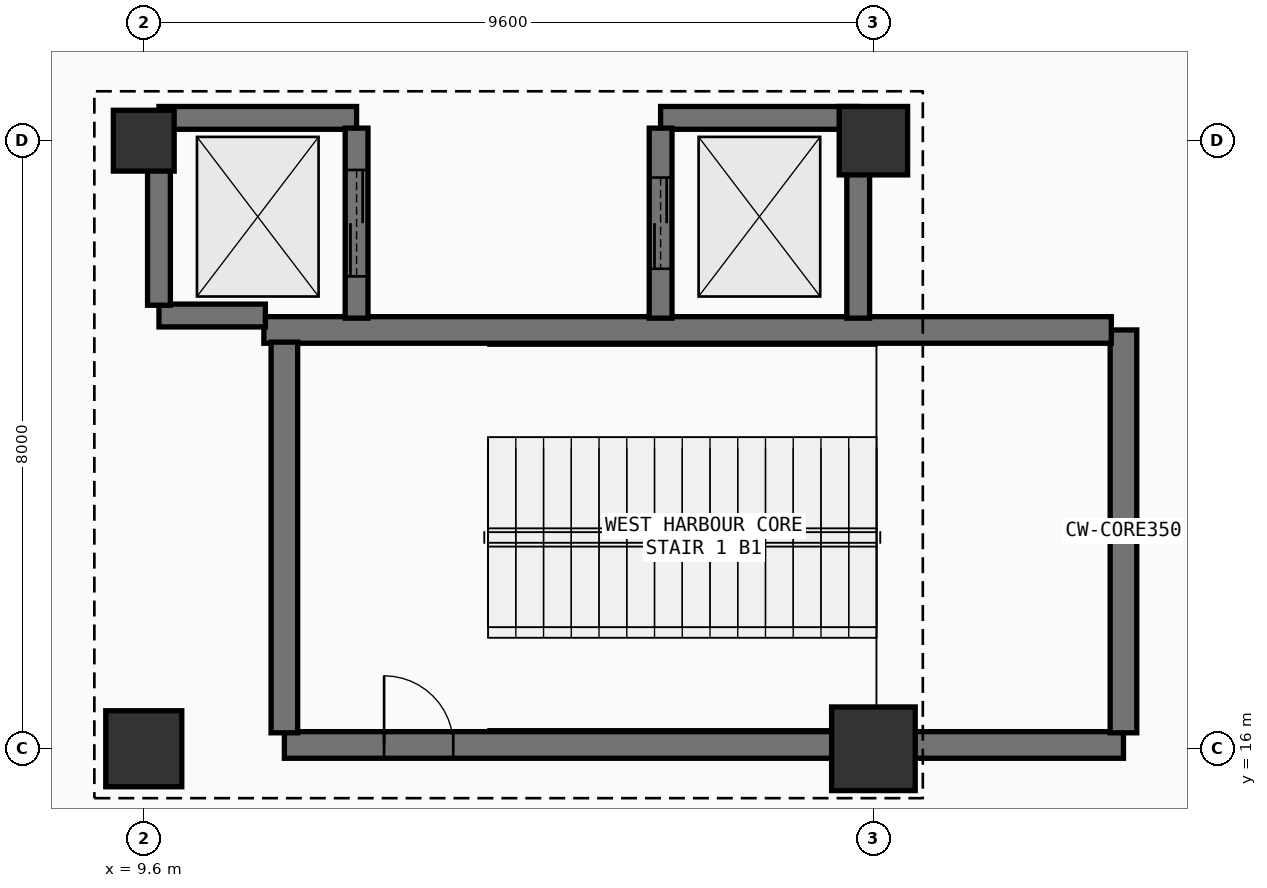
"""IFC4 building model, lengths in metres.
Left out: names, types, materials, properties, quantities, classifications, styles, units other than length and angle.
Written with IfcOpenShell. Run it as: python <this file> out.ifc"""

import sys

from ifc_helpers import new_model, si_unit, direction, frame, frame_2d, origin, origin_2d, place, context, subcontext, project, spatial, rectangle, circle, extrude, element, fill, save


model = new_model("IFC4")
c1 = context("Model", 3, precision=1e-05, world=origin(), true_north=direction((0.0, 1.0)))
c2 = subcontext(c1, "Body", "Model", "MODEL_VIEW")
j1 = project(units=[si_unit("LENGTHUNIT", "METRE"), si_unit("PLANEANGLEUNIT", "RADIAN")], contexts=[c1])
p1 = place(None, origin())
s1 = spatial("IfcSite", under=j1, at=p1, CompositionType="ELEMENT")
p2 = place(p1, origin())
s2 = spatial("IfcBuilding", under=s1, at=p2, CompositionType="ELEMENT")
p3 = place(p2, frame((0.0, 0.0, -5.4)))
s3 = spatial("IfcBuildingStorey", under=s2, at=p3, CompositionType="ELEMENT", Elevation=-5.4)
p4 = place(p3, frame((9.6, 16.0, 0.0), z_axis=(0.0, 0.0, 1.0), x_axis=(1.0, 0.0, 0.0)))
e1 = element("IfcColumn", 1, at=p4, inside=s3, PredefinedType="COLUMN", context=c2, shape_type="SweptSolid", body=[
    extrude(circle(Radius=0.5, at=origin_2d()), origin(), (0.0, 0.0, 1.0), 5.4),
])
p5 = place(p3, frame((9.6, 24.0, 0.0), z_axis=(0.0, 0.0, 1.0), x_axis=(1.0, 0.0, 0.0)))
e2 = element("IfcColumn", 2, at=p5, inside=s3, PredefinedType="COLUMN", context=c2, shape_type="SweptSolid", body=[
    extrude(circle(Radius=0.4, at=origin_2d()), origin(), (0.0, 0.0, 1.0), 5.4),
])
p6 = place(p3, frame((19.2, 16.0, 0.0), z_axis=(0.0, 0.0, 1.0), x_axis=(1.0, 0.0, 0.0)))
e3 = element("IfcColumn", 3, at=p6, inside=s3, PredefinedType="COLUMN", context=c2, shape_type="SweptSolid", body=[
    extrude(rectangle(XDim=1.1, YDim=1.1, at=origin_2d()), origin(), (0.0, 0.0, 1.0), 5.4),
])
p7 = place(p3, frame((19.2, 24.0, 0.0), z_axis=(0.0, 0.0, 1.0), x_axis=(1.0, 0.0, 0.0)))
e4 = element("IfcColumn", 4, at=p7, inside=s3, PredefinedType="COLUMN", context=c2, shape_type="SweptSolid", body=[
    extrude(rectangle(XDim=0.9, YDim=0.9, at=origin_2d()), origin(), (0.0, 0.0, 1.0), 5.4),
])
p8 = place(p3, frame((11.45, 16.05, 0.0), z_axis=(0.0, 0.0, 1.0), x_axis=(1.0, 0.0, 0.0)))
e5 = element("IfcWall", 5, at=p8, inside=s3, PredefinedType="SHEAR", context=c2, shape_type="SweptSolid", body=[
    extrude(rectangle(XDim=11.04, YDim=0.35, at=frame_2d((5.52, 0.0))), origin(), (0.0, 0.0, 1.0), 5.09),
])
p9 = place(p8, frame((1.312, 0.0, 0.0)))
e6 = element("IfcOpeningElement", 6, at=p9, cuts=e5, PredefinedType="OPENING", context=c2, shape_type="SweptSolid", body=[
    extrude(rectangle(XDim=0.91, YDim=2.08, at=frame_2d((0.455, 1.04))), frame((0.0, 0.185, 0.0), z_axis=(0.0, -1.0, 0.0), x_axis=(1.0, 0.0, 0.0)), (0.0, 0.0, 1.0), 0.37),
])
p10 = place(p3, frame((22.49, 16.21, 0.0), z_axis=(0.0, 0.0, 1.0), x_axis=(0.0, 1.0, 0.0)))
e7 = element("IfcWall", 7, at=p10, inside=s3, PredefinedType="SHEAR", context=c2, shape_type="SweptSolid", body=[
    extrude(rectangle(XDim=5.3, YDim=0.35, at=frame_2d((2.65, 0.0))), origin(), (0.0, 0.0, 1.0), 5.09),
])
p11 = place(p3, frame((22.33, 21.51, 0.0), z_axis=(0.0, 0.0, 1.0), x_axis=(-1.0, 0.0, 0.0)))
e8 = element("IfcWall", 8, at=p11, inside=s3, PredefinedType="SHEAR", context=c2, shape_type="SweptSolid", body=[
    extrude(rectangle(XDim=11.15, YDim=0.35, at=frame_2d((5.575, 0.0))), origin(), (0.0, 0.0, 1.0), 5.09),
])
p12 = place(p3, frame((11.45, 21.35, 0.0), z_axis=(0.0, 0.0, 1.0), x_axis=(0.0, -1.0, 0.0)))
e9 = element("IfcWall", 9, at=p12, inside=s3, PredefinedType="SHEAR", context=c2, shape_type="SweptSolid", body=[
    extrude(rectangle(XDim=5.14, YDim=0.35, at=frame_2d((2.57, 0.0))), origin(), (0.0, 0.0, 1.0), 5.09),
])
p13 = place(p3, frame((12.4, 24.3, 0.0), z_axis=(0.0, 0.0, 1.0), x_axis=(-1.0, 0.0, 0.0)))
e10 = element("IfcWall", 10, at=p13, inside=s3, PredefinedType="SHEAR", context=c2, shape_type="SweptSolid", body=[
    extrude(rectangle(XDim=2.6, YDim=0.3, at=frame_2d((1.3, 0.0))), origin(), (0.0, 0.0, 1.0), 5.09),
])
p14 = place(p3, frame((9.8, 21.7, 0.0), z_axis=(0.0, 0.0, 1.0), x_axis=(1.0, 0.0, 0.0)))
e11 = element("IfcWall", 11, at=p14, inside=s3, PredefinedType="SHEAR", context=c2, shape_type="SweptSolid", body=[
    extrude(rectangle(XDim=1.4, YDim=0.3, at=frame_2d((0.7, 0.0))), origin(), (0.0, 0.0, 1.0), 5.09),
])
p15 = place(p3, frame((12.4, 21.665, 0.0), z_axis=(0.0, 0.0, 1.0), x_axis=(0.0, 1.0, 0.0)))
e12 = element("IfcWall", 12, at=p15, inside=s3, PredefinedType="SHEAR", context=c2, shape_type="SweptSolid", body=[
    extrude(rectangle(XDim=2.5, YDim=0.3, at=frame_2d((1.25, 0.0))), origin(), (0.0, 0.0, 1.0), 5.09),
])
p16 = place(p15, frame((0.55, 0.0, 0.0)))
e13 = element("IfcOpeningElement", 13, at=p16, cuts=e12, PredefinedType="OPENING", context=c2, shape_type="SweptSolid", body=[
    extrude(rectangle(XDim=1.4, YDim=2.26, at=frame_2d((0.7, 1.13))), frame((0.0, 0.16, 0.0), z_axis=(0.0, -1.0, 0.0), x_axis=(1.0, 0.0, 0.0)), (0.0, 0.0, 1.0), 0.32),
])
p17 = place(p3, frame((9.8, 24.165, 0.0), z_axis=(0.0, 0.0, 1.0), x_axis=(0.0, -1.0, 0.0)))
e14 = element("IfcWall", 14, at=p17, inside=s3, PredefinedType="SHEAR", context=c2, shape_type="SweptSolid", body=[
    extrude(rectangle(XDim=2.33, YDim=0.3, at=frame_2d((1.165, 0.0))), origin(), (0.0, 0.0, 1.0), 5.09),
])
p18 = place(p3, frame((19.0, 24.3, 0.0), z_axis=(0.0, 0.0, 1.0), x_axis=(-1.0, 0.0, 0.0)))
e15 = element("IfcWall", 15, at=p18, inside=s3, PredefinedType="SHEAR", context=c2, shape_type="SweptSolid", body=[
    extrude(rectangle(XDim=2.6, YDim=0.3, at=frame_2d((1.3, 0.0))), origin(), (0.0, 0.0, 1.0), 5.09),
])
p19 = place(p3, frame((19.0, 21.665, 0.0), z_axis=(0.0, 0.0, 1.0), x_axis=(0.0, 1.0, 0.0)))
e16 = element("IfcWall", 16, at=p19, inside=s3, PredefinedType="SHEAR", context=c2, shape_type="SweptSolid", body=[
    extrude(rectangle(XDim=2.5, YDim=0.3, at=frame_2d((1.25, 0.0))), origin(), (0.0, 0.0, 1.0), 5.09),
])
p20 = place(p3, frame((16.4, 24.165, 0.0), z_axis=(0.0, 0.0, 1.0), x_axis=(0.0, -1.0, 0.0)))
e17 = element("IfcWall", 17, at=p20, inside=s3, PredefinedType="SHEAR", context=c2, shape_type="SweptSolid", body=[
    extrude(rectangle(XDim=2.5, YDim=0.3, at=frame_2d((1.25, 0.0))), origin(), (0.0, 0.0, 1.0), 5.09),
])
p21 = place(p20, frame((0.65, 0.0, 0.0)))
e18 = element("IfcOpeningElement", 18, at=p21, cuts=e17, PredefinedType="OPENING", context=c2, shape_type="SweptSolid", body=[
    extrude(rectangle(XDim=1.2, YDim=2.2, at=frame_2d((0.6, 1.1))), frame((0.0, 0.16, 0.0), z_axis=(0.0, -1.0, 0.0), x_axis=(1.0, 0.0, 0.0)), (0.0, 0.0, 1.0), 0.32),
])
p22 = place(p9, origin())
e19 = element("IfcDoor", 19, at=p22, inside=s3, OperationType="SINGLE_SWING_LEFT", PredefinedType="DOOR", context=c2, shape_type="SweptSolid", body=[
    extrude(rectangle(XDim=0.91, YDim=2.08, at=frame_2d((0.455, 1.04))), frame((0.0, 0.025, 0.0), z_axis=(0.0, -1.0, 0.0), x_axis=(1.0, 0.0, 0.0)), (0.0, 0.0, 1.0), 0.05),
])
fill(e6, e19)
p23 = place(p16, origin())
e20 = element("IfcDoor", 20, at=p23, inside=s3, OperationType="DOUBLE_DOOR_SLIDING", PredefinedType="DOOR", context=c2, shape_type="SweptSolid", body=[
    extrude(rectangle(XDim=1.4, YDim=2.26, at=frame_2d((0.7, 1.13))), frame((0.0, 0.025, 0.0), z_axis=(0.0, -1.0, 0.0), x_axis=(1.0, 0.0, 0.0)), (0.0, 0.0, 1.0), 0.05),
])
fill(e13, e20)
p24 = place(p21, origin())
e21 = element("IfcDoor", 21, at=p24, inside=s3, OperationType="DOUBLE_DOOR_SLIDING", PredefinedType="DOOR", context=c2, shape_type="SweptSolid", body=[
    extrude(rectangle(XDim=1.2, YDim=2.2, at=frame_2d((0.6, 1.1))), frame((0.0, 0.025, 0.0), z_axis=(0.0, -1.0, 0.0), x_axis=(1.0, 0.0, 0.0)), (0.0, 0.0, 1.0), 0.05),
])
fill(e18, e21)
save(model, sys.argv[1])
